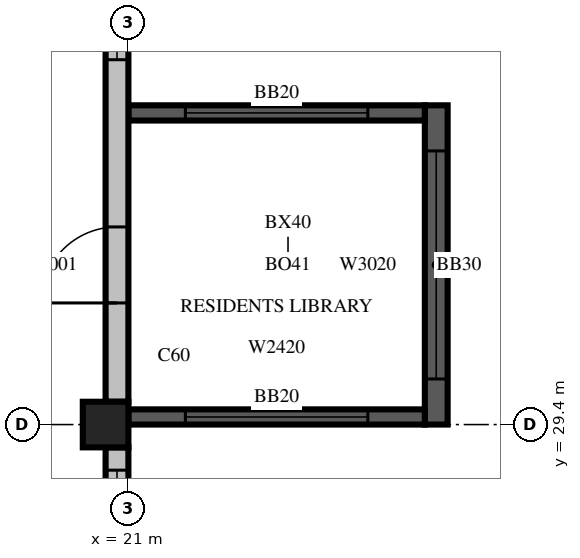
"""IFC4 building model, lengths in metres.
Left out: names, types, materials, properties, quantities, classifications, styles, units other than length and angle.
Written with IfcOpenShell. Run it as: python <this file> out.ifc"""

import sys

from ifc_helpers import new_model, si_unit, direction, frame, frame_2d, origin, origin_2d, place, context, subcontext, project, spatial, rectangle, extrude, source, transform, mapped, element, fill, save


model = new_model("IFC4")
c1 = context("Model", 3, precision=1e-05, world=origin(), true_north=direction((0.0, 1.0)))
c2 = subcontext(c1, "Body", "Model", "MODEL_VIEW")
j1 = project(units=[si_unit("LENGTHUNIT", "METRE"), si_unit("PLANEANGLEUNIT", "RADIAN")], contexts=[c1])
p1 = place(None, origin())
s1 = spatial("IfcSite", under=j1, at=p1, CompositionType="ELEMENT")
p2 = place(p1, origin())
s2 = spatial("IfcBuilding", under=s1, at=p2, CompositionType="ELEMENT")
p3 = place(p2, frame((0.0, 0.0, 354.5)))
s3 = spatial("IfcBuildingStorey", under=s2, at=p3, CompositionType="ELEMENT", Elevation=354.5)
m1 = source(origin(), c2, "Body", "SweptSolid", [
    extrude(rectangle(XDim=0.6, YDim=0.6, at=origin_2d()), origin(), (0.0, 0.0, 1.0), 3.5),
])
p4 = place(p3, frame((20.7, 29.4, 0.0), z_axis=(0.0, 0.0, 1.0), x_axis=(1.0, 0.0, 0.0)))
e1 = element("IfcColumn", 1, at=p4, inside=s3, PredefinedType="COLUMN", context=c2, shape_type="MappedRepresentation", body=[
    mapped(m1, transform((0.0, 0.0, 0.0), scale=1.0)),
])
m2 = source(origin(), c2, "Body", "SweptSolid", [
    extrude(rectangle(XDim=4.2, YDim=0.3, at=frame_2d((2.1, 0.0))), origin(), (0.0, 0.0, 1.0), 3.1),
])
p5 = place(p3, frame((25.05, 29.4, 0.0), z_axis=(0.0, 0.0, 1.0), x_axis=(0.0, 1.0, 0.0)))
e2 = element("IfcWall", 2, at=p5, inside=s3, PredefinedType="SOLIDWALL", context=c2, shape_type="MappedRepresentation", body=[
    mapped(m2, transform((0.0, 0.0, 0.0), scale=1.0)),
])
m3 = source(origin(), c2, "Body", "SweptSolid", [
    extrude(rectangle(XDim=3.0, YDim=2.0, at=frame_2d((1.5, 1.0))), frame((0.0, 0.16, 0.0), z_axis=(0.0, -1.0, 0.0), x_axis=(1.0, 0.0, 0.0)), (0.0, 0.0, 1.0), 0.32),
])
p6 = place(p5, frame((0.6, 0.0, 0.6)))
e3 = element("IfcOpeningElement", 3, at=p6, cuts=e2, PredefinedType="OPENING", context=c2, shape_type="MappedRepresentation", body=[
    mapped(m3, transform((0.0, 0.0, 0.0), scale=1.0)),
])
m4 = source(origin(), c2, "Body", "SweptSolid", [
    extrude(rectangle(XDim=3.9, YDim=0.2, at=frame_2d((1.95, 0.0))), origin(), (0.0, 0.0, 1.0), 3.1),
])
p7 = place(p3, frame((21.0, 29.5, 0.0), z_axis=(0.0, 0.0, 1.0), x_axis=(1.0, 0.0, 0.0)))
e4 = element("IfcWall", 4, at=p7, inside=s3, PredefinedType="SOLIDWALL", context=c2, shape_type="MappedRepresentation", body=[
    mapped(m4, transform((0.0, 0.0, 0.0), scale=1.0)),
])
m5 = source(origin(), c2, "Body", "SweptSolid", [
    extrude(rectangle(XDim=2.4, YDim=2.0, at=frame_2d((1.2, 1.0))), frame((0.0, 0.11, 0.0), z_axis=(0.0, -1.0, 0.0), x_axis=(1.0, 0.0, 0.0)), (0.0, 0.0, 1.0), 0.22),
])
p8 = place(p7, frame((0.75, 0.0, 0.6)))
e5 = element("IfcOpeningElement", 5, at=p8, cuts=e4, PredefinedType="OPENING", context=c2, shape_type="MappedRepresentation", body=[
    mapped(m5, transform((0.0, 0.0, 0.0), scale=1.0)),
])
p9 = place(p3, frame((21.0, 33.5, 0.0), z_axis=(0.0, 0.0, 1.0), x_axis=(1.0, 0.0, 0.0)))
e6 = element("IfcWall", 6, at=p9, inside=s3, PredefinedType="SOLIDWALL", context=c2, shape_type="MappedRepresentation", body=[
    mapped(m4, transform((0.0, 0.0, 0.0), scale=1.0)),
])
p10 = place(p9, frame((0.75, 0.0, 0.6)))
e7 = element("IfcOpeningElement", 7, at=p10, cuts=e6, PredefinedType="OPENING", context=c2, shape_type="MappedRepresentation", body=[
    mapped(m5, transform((0.0, 0.0, 0.0), scale=1.0)),
])
m6 = source(origin(), c2, "Body", "SweptSolid", [
    extrude(rectangle(XDim=7.5, YDim=0.3, at=frame_2d((3.75, 0.0))), origin(), (0.0, 0.0, 1.0), 3.1),
])
p11 = place(p3, frame((20.85, 21.6, 0.0), z_axis=(0.0, 0.0, 1.0), x_axis=(0.0, 1.0, 0.0)))
e8 = element("IfcWall", 8, at=p11, inside=s3, PredefinedType="STANDARD", context=c2, shape_type="MappedRepresentation", body=[
    mapped(m6, transform((0.0, 0.0, 0.0), scale=1.0)),
])
m7 = source(origin(), c2, "Body", "SweptSolid", [
    extrude(rectangle(XDim=2.4, YDim=2.0, at=frame_2d((1.2, 1.0))), frame((0.0, 0.16, 0.0), z_axis=(0.0, -1.0, 0.0), x_axis=(1.0, 0.0, 0.0)), (0.0, 0.0, 1.0), 0.32),
])
p12 = place(p11, frame((0.3, 0.0, 0.6)))
e9 = element("IfcOpeningElement", 9, at=p12, cuts=e8, PredefinedType="OPENING", context=c2, shape_type="MappedRepresentation", body=[
    mapped(m7, transform((0.0, 0.0, 0.0), scale=1.0)),
])
p13 = place(p11, frame((4.2, 0.0, 0.6)))
e10 = element("IfcOpeningElement", 10, at=p13, cuts=e8, PredefinedType="OPENING", context=c2, shape_type="MappedRepresentation", body=[
    mapped(m3, transform((0.0, 0.0, 0.0), scale=1.0)),
])
m8 = source(origin(), c2, "Body", "SweptSolid", [
    extrude(rectangle(XDim=7.8, YDim=0.3, at=frame_2d((3.9, 0.0))), origin(), (0.0, 0.0, 1.0), 3.1),
])
p14 = place(p3, frame((20.85, 29.7, 0.0), z_axis=(0.0, 0.0, 1.0), x_axis=(0.0, 1.0, 0.0)))
e11 = element("IfcWall", 11, at=p14, inside=s3, PredefinedType="STANDARD", context=c2, shape_type="MappedRepresentation", body=[
    mapped(m8, transform((0.0, 0.0, 0.0), scale=1.0)),
])
p15 = place(p14, frame((4.5, 0.0, 0.6)))
e12 = element("IfcOpeningElement", 12, at=p15, cuts=e11, PredefinedType="OPENING", context=c2, shape_type="MappedRepresentation", body=[
    mapped(m3, transform((0.0, 0.0, 0.0), scale=1.0)),
])
m9 = source(origin(), c2, "Body", "SweptSolid", [
    extrude(rectangle(XDim=1.0, YDim=2.1, at=frame_2d((0.5, 1.05))), frame((0.0, 0.16, 0.0), z_axis=(0.0, -1.0, 0.0), x_axis=(1.0, 0.0, 0.0)), (0.0, 0.0, 1.0), 0.32),
])
p16 = place(p14, frame((1.3, 0.0, 0.0)))
e13 = element("IfcOpeningElement", 13, at=p16, cuts=e11, PredefinedType="OPENING", context=c2, shape_type="MappedRepresentation", body=[
    mapped(m9, transform((0.0, 0.0, 0.0), scale=1.0)),
])
m10 = source(origin(), c2, "Body", "SweptSolid", [
    extrude(rectangle(XDim=3.0, YDim=2.0, at=frame_2d((1.5, 1.0))), frame((0.0, 0.03, 0.0), z_axis=(0.0, -1.0, 0.0), x_axis=(1.0, 0.0, 0.0)), (0.0, 0.0, 1.0), 0.06),
])
p17 = place(p6, origin())
e14 = element("IfcWindow", 14, at=p17, inside=s3, PartitioningType="SINGLE_PANEL", PredefinedType="WINDOW", context=c2, shape_type="MappedRepresentation", body=[
    mapped(m10, transform((0.0, 0.0, 0.0), scale=1.0)),
])
fill(e3, e14)
m11 = source(origin(), c2, "Body", "SweptSolid", [
    extrude(rectangle(XDim=2.4, YDim=2.0, at=frame_2d((1.2, 1.0))), frame((0.0, 0.03, 0.0), z_axis=(0.0, -1.0, 0.0), x_axis=(1.0, 0.0, 0.0)), (0.0, 0.0, 1.0), 0.06),
])
p18 = place(p8, origin())
e15 = element("IfcWindow", 15, at=p18, inside=s3, PartitioningType="SINGLE_PANEL", PredefinedType="WINDOW", context=c2, shape_type="MappedRepresentation", body=[
    mapped(m11, transform((0.0, 0.0, 0.0), scale=1.0)),
])
fill(e5, e15)
p19 = place(p10, origin())
e16 = element("IfcWindow", 16, at=p19, inside=s3, PartitioningType="SINGLE_PANEL", PredefinedType="WINDOW", context=c2, shape_type="MappedRepresentation", body=[
    mapped(m11, transform((0.0, 0.0, 0.0), scale=1.0)),
])
fill(e7, e16)
p20 = place(p13, origin())
e17 = element("IfcWindow", 17, at=p20, inside=s3, PartitioningType="SINGLE_PANEL", PredefinedType="WINDOW", context=c2, shape_type="MappedRepresentation", body=[
    mapped(m10, transform((0.0, 0.0, 0.0), scale=1.0)),
])
fill(e10, e17)
p21 = place(p15, origin())
e18 = element("IfcWindow", 18, at=p21, inside=s3, PartitioningType="SINGLE_PANEL", PredefinedType="WINDOW", context=c2, shape_type="MappedRepresentation", body=[
    mapped(m10, transform((0.0, 0.0, 0.0), scale=1.0)),
])
fill(e12, e18)
m12 = source(origin(), c2, "Body", "SweptSolid", [
    extrude(rectangle(XDim=1.0, YDim=2.1, at=frame_2d((0.5, 1.05))), frame((0.0, 0.025, 0.0), z_axis=(0.0, -1.0, 0.0), x_axis=(1.0, 0.0, 0.0)), (0.0, 0.0, 1.0), 0.05),
])
p22 = place(p16, origin())
e19 = element("IfcDoor", 19, at=p22, inside=s3, OperationType="SINGLE_SWING_LEFT", PredefinedType="DOOR", context=c2, shape_type="MappedRepresentation", body=[
    mapped(m12, transform((0.0, 0.0, 0.0), scale=1.0)),
])
fill(e13, e19)
save(model, sys.argv[1])
